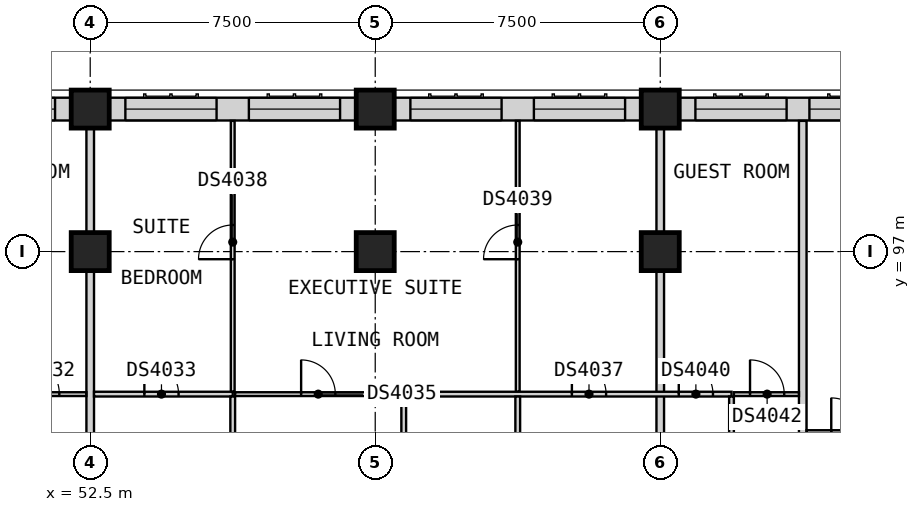
"""IFC4 building model, lengths in metres.
Left out: names, types, materials, properties, quantities, classifications, styles, units other than length and angle.
Written with IfcOpenShell. Run it as: python <this file> out.ifc"""

import sys

from ifc_helpers import new_model, si_unit, direction, frame, frame_2d, origin, origin_2d, place, context, subcontext, project, spatial, rectangle, extrude, element, fill, save


model = new_model("IFC4")
c1 = context("Model", 3, precision=1e-05, world=origin(), true_north=direction((0.0, 1.0)))
c2 = subcontext(c1, "Body", "Model", "MODEL_VIEW")
j1 = project(units=[si_unit("LENGTHUNIT", "METRE"), si_unit("PLANEANGLEUNIT", "RADIAN")], contexts=[c1])
p1 = place(None, origin())
s1 = spatial("IfcSite", under=j1, at=p1, CompositionType="ELEMENT")
p2 = place(p1, origin())
s2 = spatial("IfcBuilding", under=s1, at=p2, CompositionType="ELEMENT")
p3 = place(p2, frame((0.0, 0.0, 141.0)))
s3 = spatial("IfcBuildingStorey", under=s2, at=p3, CompositionType="ELEMENT", Elevation=141.0)
for number, where, z_axis, x_axis in (
    (1, (52.5, 100.75, 0.0), (0.0, 0.0, 1.0), (1.0, 0.0, 0.0)),
    (2, (60.0, 100.75, 0.0), (0.0, 0.0, 1.0), (1.0, 0.0, 0.0)),
    (3, (67.5, 100.75, 0.0), (0.0, 0.0, 1.0), (1.0, 0.0, 0.0)),
    (4, (52.5, 97.0, 0.0), (0.0, 0.0, 1.0), (1.0, 0.0, 0.0)),
    (5, (60.0, 97.0, 0.0), (0.0, 0.0, 1.0), (1.0, 0.0, 0.0)),
    (6, (67.5, 97.0, 0.0), (0.0, 0.0, 1.0), (1.0, 0.0, 0.0)),
):
    element("IfcColumn", number, at=place(p3, frame(where, z_axis=z_axis, x_axis=x_axis)), inside=s3, PredefinedType="COLUMN", context=c2, shape_type="SweptSolid", body=[
        extrude(rectangle(XDim=1.0, YDim=1.0, at=origin_2d()), origin(), (0.0, 0.0, 1.0), 3.6),
    ])
p4 = place(p3, frame((74.0, 100.75, 0.0), z_axis=(0.0, 0.0, 1.0), x_axis=(-1.0, 0.0, 0.0)))
e7 = element("IfcWall", 7, at=p4, inside=s3, PredefinedType="SOLIDWALL", context=c2, shape_type="SweptSolid", body=[
    extrude(rectangle(XDim=6.0, YDim=0.6, at=frame_2d((3.0, 0.0))), origin(), (0.0, 0.0, 1.0), 2.85),
])
p5 = place(p4, frame((3.175, 0.0, 0.8)))
e8 = element("IfcOpeningElement", 8, at=p5, cuts=e7, PredefinedType="OPENING", context=c2, shape_type="SweptSolid", body=[
    extrude(rectangle(XDim=2.4, YDim=1.8, at=frame_2d((1.2, 0.9))), frame((0.0, 0.31, 0.0), z_axis=(0.0, -1.0, 0.0), x_axis=(1.0, 0.0, 0.0)), (0.0, 0.0, 1.0), 0.62),
])
p6 = place(p4, frame((0.175, 0.0, 0.8)))
e9 = element("IfcOpeningElement", 9, at=p6, cuts=e7, PredefinedType="OPENING", context=c2, shape_type="SweptSolid", body=[
    extrude(rectangle(XDim=2.4, YDim=1.8, at=frame_2d((1.2, 0.9))), frame((0.0, 0.31, 0.0), z_axis=(0.0, -1.0, 0.0), x_axis=(1.0, 0.0, 0.0)), (0.0, 0.0, 1.0), 0.62),
])
p7 = place(p3, frame((67.0, 100.75, 0.0), z_axis=(0.0, 0.0, 1.0), x_axis=(-1.0, 0.0, 0.0)))
e10 = element("IfcWall", 10, at=p7, inside=s3, PredefinedType="SOLIDWALL", context=c2, shape_type="SweptSolid", body=[
    extrude(rectangle(XDim=6.5, YDim=0.6, at=frame_2d((3.25, 0.0))), origin(), (0.0, 0.0, 1.0), 2.85),
])
p8 = place(p7, frame((3.675, 0.0, 0.8)))
e11 = element("IfcOpeningElement", 11, at=p8, cuts=e10, PredefinedType="OPENING", context=c2, shape_type="SweptSolid", body=[
    extrude(rectangle(XDim=2.4, YDim=1.8, at=frame_2d((1.2, 0.9))), frame((0.0, 0.31, 0.0), z_axis=(0.0, -1.0, 0.0), x_axis=(1.0, 0.0, 0.0)), (0.0, 0.0, 1.0), 0.62),
])
p9 = place(p7, frame((0.425, 0.0, 0.8)))
e12 = element("IfcOpeningElement", 12, at=p9, cuts=e10, PredefinedType="OPENING", context=c2, shape_type="SweptSolid", body=[
    extrude(rectangle(XDim=2.4, YDim=1.8, at=frame_2d((1.2, 0.9))), frame((0.0, 0.31, 0.0), z_axis=(0.0, -1.0, 0.0), x_axis=(1.0, 0.0, 0.0)), (0.0, 0.0, 1.0), 0.62),
])
p10 = place(p3, frame((59.5, 100.75, 0.0), z_axis=(0.0, 0.0, 1.0), x_axis=(-1.0, 0.0, 0.0)))
e13 = element("IfcWall", 13, at=p10, inside=s3, PredefinedType="SOLIDWALL", context=c2, shape_type="SweptSolid", body=[
    extrude(rectangle(XDim=6.5, YDim=0.6, at=frame_2d((3.25, 0.0))), origin(), (0.0, 0.0, 1.0), 2.85),
])
p11 = place(p10, frame((3.675, 0.0, 0.8)))
e14 = element("IfcOpeningElement", 14, at=p11, cuts=e13, PredefinedType="OPENING", context=c2, shape_type="SweptSolid", body=[
    extrude(rectangle(XDim=2.4, YDim=1.8, at=frame_2d((1.2, 0.9))), frame((0.0, 0.31, 0.0), z_axis=(0.0, -1.0, 0.0), x_axis=(1.0, 0.0, 0.0)), (0.0, 0.0, 1.0), 0.62),
])
p12 = place(p10, frame((0.425, 0.0, 0.8)))
e15 = element("IfcOpeningElement", 15, at=p12, cuts=e13, PredefinedType="OPENING", context=c2, shape_type="SweptSolid", body=[
    extrude(rectangle(XDim=2.4, YDim=1.8, at=frame_2d((1.2, 0.9))), frame((0.0, 0.31, 0.0), z_axis=(0.0, -1.0, 0.0), x_axis=(1.0, 0.0, 0.0)), (0.0, 0.0, 1.0), 0.62),
])
p13 = place(p3, frame((52.0, 100.75, 0.0), z_axis=(0.0, 0.0, 1.0), x_axis=(-1.0, 0.0, 0.0)))
e16 = element("IfcWall", 16, at=p13, inside=s3, PredefinedType="SOLIDWALL", context=c2, shape_type="SweptSolid", body=[
    extrude(rectangle(XDim=6.5, YDim=0.6, at=frame_2d((3.25, 0.0))), origin(), (0.0, 0.0, 1.0), 2.85),
])
p14 = place(p13, frame((3.675, 0.0, 0.8)))
e17 = element("IfcOpeningElement", 17, at=p14, cuts=e16, PredefinedType="OPENING", context=c2, shape_type="SweptSolid", body=[
    extrude(rectangle(XDim=2.4, YDim=1.8, at=frame_2d((1.2, 0.9))), frame((0.0, 0.31, 0.0), z_axis=(0.0, -1.0, 0.0), x_axis=(1.0, 0.0, 0.0)), (0.0, 0.0, 1.0), 0.62),
])
p15 = place(p13, frame((0.425, 0.0, 0.8)))
e18 = element("IfcOpeningElement", 18, at=p15, cuts=e16, PredefinedType="OPENING", context=c2, shape_type="SweptSolid", body=[
    extrude(rectangle(XDim=2.4, YDim=1.8, at=frame_2d((1.2, 0.9))), frame((0.0, 0.31, 0.0), z_axis=(0.0, -1.0, 0.0), x_axis=(1.0, 0.0, 0.0)), (0.0, 0.0, 1.0), 0.62),
])
for number, where, z_axis, x_axis in (
    (19, (52.5, 88.725, 0.0), (0.0, 0.0, 1.0), (0.0, 1.0, 0.0)),
    (20, (67.5, 88.725, 0.0), (0.0, 0.0, 1.0), (0.0, 1.0, 0.0)),
):
    element("IfcWall", number, at=place(p3, frame(where, z_axis=z_axis, x_axis=x_axis)), inside=s3, PredefinedType="PARTITIONING", context=c2, shape_type="SweptSolid", body=[
        extrude(rectangle(XDim=12.525, YDim=0.2, at=frame_2d((6.262, 0.0))), origin(), (0.0, 0.0, 1.0), 3.35),
    ])
p16 = place(p3, frame((71.25, 88.725, 0.0), z_axis=(0.0, 0.0, 1.0), x_axis=(0.0, 1.0, 0.0)))
e21 = element("IfcWall", 21, at=p16, inside=s3, PredefinedType="PARTITIONING", context=c2, shape_type="SweptSolid", body=[
    extrude(rectangle(XDim=11.715, YDim=0.2, at=frame_2d((5.857, 0.0))), origin(), (0.0, 0.0, 1.0), 3.35),
])
p17 = place(p3, frame((71.35, 92.25, 0.0), z_axis=(0.0, 0.0, 1.0), x_axis=(1.0, 0.0, 0.0)))
e22 = element("IfcWall", 22, at=p17, inside=s3, PredefinedType="PARTITIONING", context=c2, shape_type="SweptSolid", body=[
    extrude(rectangle(XDim=7.35, YDim=0.1, at=frame_2d((3.675, 0.0))), origin(), (0.0, 0.0, 1.0), 3.35),
])
p18 = place(p17, frame((0.65, 0.0, 0.0)))
e23 = element("IfcOpeningElement", 23, at=p18, cuts=e22, PredefinedType="OPENING", context=c2, shape_type="SweptSolid", body=[
    extrude(rectangle(XDim=0.9, YDim=2.1, at=frame_2d((0.45, 1.05))), frame((0.0, 0.06, 0.0), z_axis=(0.0, -1.0, 0.0), x_axis=(1.0, 0.0, 0.0)), (0.0, 0.0, 1.0), 0.12),
])
p19 = place(p3, frame((49.938, 93.25, 0.0), z_axis=(0.0, 0.0, 1.0), x_axis=(1.0, 0.0, 0.0)))
e24 = element("IfcWall", 24, at=p19, inside=s3, PredefinedType="PARTITIONING", context=c2, shape_type="SweptSolid", body=[
    extrude(rectangle(XDim=2.462, YDim=0.1, at=frame_2d((1.231, 0.0))), origin(), (0.0, 0.0, 1.0), 3.35),
])
p20 = place(p19, frame((0.75, 0.0, 0.0)))
e25 = element("IfcOpeningElement", 25, at=p20, cuts=e24, PredefinedType="OPENING", context=c2, shape_type="SweptSolid", body=[
    extrude(rectangle(XDim=1.0, YDim=2.1, at=frame_2d((0.5, 1.05))), frame((0.0, 0.06, 0.0), z_axis=(0.0, -1.0, 0.0), x_axis=(1.0, 0.0, 0.0)), (0.0, 0.0, 1.0), 0.12),
])
p21 = place(p3, frame((56.312, 93.25, 0.0), z_axis=(0.0, 0.0, 1.0), x_axis=(1.0, 0.0, 0.0)))
e26 = element("IfcWall", 26, at=p21, inside=s3, PredefinedType="PARTITIONING", context=c2, shape_type="SweptSolid", body=[
    extrude(rectangle(XDim=4.375, YDim=0.1, at=frame_2d((2.188, 0.0))), origin(), (0.0, 0.0, 1.0), 3.35),
])
p22 = place(p21, frame((1.738, 0.0, 0.0)))
e27 = element("IfcOpeningElement", 27, at=p22, cuts=e26, PredefinedType="OPENING", context=c2, shape_type="SweptSolid", body=[
    extrude(rectangle(XDim=0.9, YDim=2.1, at=frame_2d((0.45, 1.05))), frame((0.0, 0.06, 0.0), z_axis=(0.0, -1.0, 0.0), x_axis=(1.0, 0.0, 0.0)), (0.0, 0.0, 1.0), 0.12),
])
p23 = place(p3, frame((69.438, 93.25, 0.0), z_axis=(0.0, 0.0, 1.0), x_axis=(1.0, 0.0, 0.0)))
e28 = element("IfcWall", 28, at=p23, inside=s3, PredefinedType="PARTITIONING", context=c2, shape_type="SweptSolid", body=[
    extrude(rectangle(XDim=1.712, YDim=0.1, at=frame_2d((0.856, 0.0))), origin(), (0.0, 0.0, 1.0), 3.35),
])
p24 = place(p23, frame((0.425, 0.0, 0.0)))
e29 = element("IfcOpeningElement", 29, at=p24, cuts=e28, PredefinedType="OPENING", context=c2, shape_type="SweptSolid", body=[
    extrude(rectangle(XDim=0.9, YDim=2.1, at=frame_2d((0.45, 1.05))), frame((0.0, 0.06, 0.0), z_axis=(0.0, -1.0, 0.0), x_axis=(1.0, 0.0, 0.0)), (0.0, 0.0, 1.0), 0.12),
])
p25 = place(p3, frame((56.25, 93.312, 0.0), z_axis=(0.0, 0.0, 1.0), x_axis=(0.0, 1.0, 0.0)))
e30 = element("IfcWall", 30, at=p25, inside=s3, PredefinedType="PARTITIONING", context=c2, shape_type="SweptSolid", body=[
    extrude(rectangle(XDim=7.127, YDim=0.1, at=frame_2d((3.564, 0.0))), origin(), (0.0, 0.0, 1.0), 3.35),
])
p26 = place(p25, frame((3.488, 0.0, 0.0)))
e31 = element("IfcOpeningElement", 31, at=p26, cuts=e30, PredefinedType="OPENING", context=c2, shape_type="SweptSolid", body=[
    extrude(rectangle(XDim=0.9, YDim=2.1, at=frame_2d((0.45, 1.05))), frame((0.0, 0.06, 0.0), z_axis=(0.0, -1.0, 0.0), x_axis=(1.0, 0.0, 0.0)), (0.0, 0.0, 1.0), 0.12),
])
p27 = place(p3, frame((63.75, 93.312, 0.0), z_axis=(0.0, 0.0, 1.0), x_axis=(0.0, 1.0, 0.0)))
e32 = element("IfcWall", 32, at=p27, inside=s3, PredefinedType="PARTITIONING", context=c2, shape_type="SweptSolid", body=[
    extrude(rectangle(XDim=7.127, YDim=0.1, at=frame_2d((3.564, 0.0))), origin(), (0.0, 0.0, 1.0), 3.35),
])
p28 = place(p27, frame((3.488, 0.0, 0.0)))
e33 = element("IfcOpeningElement", 33, at=p28, cuts=e32, PredefinedType="OPENING", context=c2, shape_type="SweptSolid", body=[
    extrude(rectangle(XDim=0.9, YDim=2.1, at=frame_2d((0.45, 1.05))), frame((0.0, 0.06, 0.0), z_axis=(0.0, -1.0, 0.0), x_axis=(1.0, 0.0, 0.0)), (0.0, 0.0, 1.0), 0.12),
])
p29 = place(p3, frame((52.6, 93.25, 0.0), z_axis=(0.0, 0.0, 1.0), x_axis=(1.0, 0.0, 0.0)))
e34 = element("IfcWall", 34, at=p29, inside=s3, PredefinedType="PARTITIONING", context=c2, shape_type="SweptSolid", body=[
    extrude(rectangle(XDim=3.65, YDim=0.125, at=frame_2d((1.825, 0.0))), origin(), (0.0, 0.0, 1.0), 3.35),
])
p30 = place(p29, frame((1.325, 0.0, 0.0)))
e35 = element("IfcOpeningElement", 35, at=p30, cuts=e34, PredefinedType="OPENING", context=c2, shape_type="SweptSolid", body=[
    extrude(rectangle(XDim=0.9, YDim=2.1, at=frame_2d((0.45, 1.05))), frame((0.0, 0.073, 0.0), z_axis=(0.0, -1.0, 0.0), x_axis=(1.0, 0.0, 0.0)), (0.0, 0.0, 1.0), 0.145),
])
p31 = place(p3, frame((60.75, 93.25, 0.0), z_axis=(0.0, 0.0, 1.0), x_axis=(1.0, 0.0, 0.0)))
e36 = element("IfcWall", 36, at=p31, inside=s3, PredefinedType="PARTITIONING", context=c2, shape_type="SweptSolid", body=[
    extrude(rectangle(XDim=8.625, YDim=0.125, at=frame_2d((4.312, 0.0))), origin(), (0.0, 0.0, 1.0), 3.35),
])
p32 = place(p31, frame((4.425, 0.0, 0.0)))
e37 = element("IfcOpeningElement", 37, at=p32, cuts=e36, PredefinedType="OPENING", context=c2, shape_type="SweptSolid", body=[
    extrude(rectangle(XDim=0.9, YDim=2.1, at=frame_2d((0.45, 1.05))), frame((0.0, 0.073, 0.0), z_axis=(0.0, -1.0, 0.0), x_axis=(1.0, 0.0, 0.0)), (0.0, 0.0, 1.0), 0.145),
])
p33 = place(p31, frame((7.238, 0.0, 0.0)))
e38 = element("IfcOpeningElement", 38, at=p33, cuts=e36, PredefinedType="OPENING", context=c2, shape_type="SweptSolid", body=[
    extrude(rectangle(XDim=0.9, YDim=2.1, at=frame_2d((0.45, 1.05))), frame((0.0, 0.073, 0.0), z_axis=(0.0, -1.0, 0.0), x_axis=(1.0, 0.0, 0.0)), (0.0, 0.0, 1.0), 0.145),
])
p34 = place(p3, frame((56.25, 88.725, 0.0), z_axis=(0.0, 0.0, 1.0), x_axis=(0.0, 1.0, 0.0)))
e39 = element("IfcWall", 39, at=p34, inside=s3, PredefinedType="PARTITIONING", context=c2, shape_type="SweptSolid", body=[
    extrude(rectangle(XDim=4.462, YDim=0.125, at=frame_2d((2.231, 0.0))), origin(), (0.0, 0.0, 1.0), 3.35),
])
p35 = place(p3, frame((60.75, 88.725, 0.0), z_axis=(0.0, 0.0, 1.0), x_axis=(0.0, 1.0, 0.0)))
e40 = element("IfcWall", 40, at=p35, inside=s3, PredefinedType="PARTITIONING", context=c2, shape_type="SweptSolid", body=[
    extrude(rectangle(XDim=4.462, YDim=0.125, at=frame_2d((2.231, 0.0))), origin(), (0.0, 0.0, 1.0), 3.35),
])
p36 = place(p35, frame((1.825, 0.0, 0.0)))
e41 = element("IfcOpeningElement", 41, at=p36, cuts=e40, PredefinedType="OPENING", context=c2, shape_type="SweptSolid", body=[
    extrude(rectangle(XDim=0.9, YDim=2.1, at=frame_2d((0.45, 1.05))), frame((0.0, 0.073, 0.0), z_axis=(0.0, -1.0, 0.0), x_axis=(1.0, 0.0, 0.0)), (0.0, 0.0, 1.0), 0.145),
])
for number, where, z_axis, x_axis in (
    (42, (63.75, 88.725, 0.0), (0.0, 0.0, 1.0), (0.0, 1.0, 0.0)),
    (43, (69.375, 88.725, 0.0), (0.0, 0.0, 1.0), (0.0, 1.0, 0.0)),
):
    element("IfcWall", number, at=place(p3, frame(where, z_axis=z_axis, x_axis=x_axis)), inside=s3, PredefinedType="PARTITIONING", context=c2, shape_type="SweptSolid", body=[
        extrude(rectangle(XDim=4.462, YDim=0.125, at=frame_2d((2.231, 0.0))), origin(), (0.0, 0.0, 1.0), 3.35),
    ])
p37 = place(p5, origin())
e44 = element("IfcWindow", 44, at=p37, inside=s3, PartitioningType="SINGLE_PANEL", PredefinedType="WINDOW", context=c2, shape_type="SweptSolid", body=[
    extrude(rectangle(XDim=2.4, YDim=1.8, at=frame_2d((1.2, 0.9))), frame((0.0, -0.07, 0.0), z_axis=(0.0, -1.0, 0.0), x_axis=(1.0, 0.0, 0.0)), (0.0, 0.0, 1.0), 0.06),
])
fill(e8, e44)
p38 = place(p6, origin())
e45 = element("IfcWindow", 45, at=p38, inside=s3, PartitioningType="SINGLE_PANEL", PredefinedType="WINDOW", context=c2, shape_type="SweptSolid", body=[
    extrude(rectangle(XDim=2.4, YDim=1.8, at=frame_2d((1.2, 0.9))), frame((0.0, -0.07, 0.0), z_axis=(0.0, -1.0, 0.0), x_axis=(1.0, 0.0, 0.0)), (0.0, 0.0, 1.0), 0.06),
])
fill(e9, e45)
p39 = place(p8, origin())
e46 = element("IfcWindow", 46, at=p39, inside=s3, PartitioningType="SINGLE_PANEL", PredefinedType="WINDOW", context=c2, shape_type="SweptSolid", body=[
    extrude(rectangle(XDim=2.4, YDim=1.8, at=frame_2d((1.2, 0.9))), frame((0.0, -0.07, 0.0), z_axis=(0.0, -1.0, 0.0), x_axis=(1.0, 0.0, 0.0)), (0.0, 0.0, 1.0), 0.06),
])
fill(e11, e46)
p40 = place(p9, origin())
e47 = element("IfcWindow", 47, at=p40, inside=s3, PartitioningType="SINGLE_PANEL", PredefinedType="WINDOW", context=c2, shape_type="SweptSolid", body=[
    extrude(rectangle(XDim=2.4, YDim=1.8, at=frame_2d((1.2, 0.9))), frame((0.0, -0.07, 0.0), z_axis=(0.0, -1.0, 0.0), x_axis=(1.0, 0.0, 0.0)), (0.0, 0.0, 1.0), 0.06),
])
fill(e12, e47)
p41 = place(p11, origin())
e48 = element("IfcWindow", 48, at=p41, inside=s3, PartitioningType="SINGLE_PANEL", PredefinedType="WINDOW", context=c2, shape_type="SweptSolid", body=[
    extrude(rectangle(XDim=2.4, YDim=1.8, at=frame_2d((1.2, 0.9))), frame((0.0, -0.07, 0.0), z_axis=(0.0, -1.0, 0.0), x_axis=(1.0, 0.0, 0.0)), (0.0, 0.0, 1.0), 0.06),
])
fill(e14, e48)
p42 = place(p12, origin())
e49 = element("IfcWindow", 49, at=p42, inside=s3, PartitioningType="SINGLE_PANEL", PredefinedType="WINDOW", context=c2, shape_type="SweptSolid", body=[
    extrude(rectangle(XDim=2.4, YDim=1.8, at=frame_2d((1.2, 0.9))), frame((0.0, -0.07, 0.0), z_axis=(0.0, -1.0, 0.0), x_axis=(1.0, 0.0, 0.0)), (0.0, 0.0, 1.0), 0.06),
])
fill(e15, e49)
p43 = place(p15, origin())
e50 = element("IfcWindow", 50, at=p43, inside=s3, PartitioningType="SINGLE_PANEL", PredefinedType="WINDOW", context=c2, shape_type="SweptSolid", body=[
    extrude(rectangle(XDim=2.4, YDim=1.8, at=frame_2d((1.2, 0.9))), frame((0.0, -0.07, 0.0), z_axis=(0.0, -1.0, 0.0), x_axis=(1.0, 0.0, 0.0)), (0.0, 0.0, 1.0), 0.06),
])
fill(e18, e50)
p44 = place(p20, origin())
e51 = element("IfcDoor", 51, at=p44, inside=s3, OperationType="SINGLE_SWING_RIGHT", PredefinedType="DOOR", context=c2, shape_type="SweptSolid", body=[
    extrude(rectangle(XDim=1.0, YDim=2.1, at=frame_2d((0.5, 1.05))), frame((0.0, 0.025, 0.0), z_axis=(0.0, -1.0, 0.0), x_axis=(1.0, 0.0, 0.0)), (0.0, 0.0, 1.0), 0.05),
])
fill(e25, e51)
p45 = place(p30, origin())
e52 = element("IfcDoor", 52, at=p45, inside=s3, OperationType="SINGLE_SWING_RIGHT", PredefinedType="DOOR", context=c2, shape_type="SweptSolid", body=[
    extrude(rectangle(XDim=0.9, YDim=2.1, at=frame_2d((0.45, 1.05))), frame((0.0, 0.025, 0.0), z_axis=(0.0, -1.0, 0.0), x_axis=(1.0, 0.0, 0.0)), (0.0, 0.0, 1.0), 0.05),
])
fill(e35, e52)
p46 = place(p22, origin())
e53 = element("IfcDoor", 53, at=p46, inside=s3, OperationType="SINGLE_SWING_RIGHT", PredefinedType="DOOR", context=c2, shape_type="SweptSolid", body=[
    extrude(rectangle(XDim=0.9, YDim=2.1, at=frame_2d((0.45, 1.05))), frame((0.0, 0.025, 0.0), z_axis=(0.0, -1.0, 0.0), x_axis=(1.0, 0.0, 0.0)), (0.0, 0.0, 1.0), 0.05),
])
fill(e27, e53)
p47 = place(p32, origin())
e54 = element("IfcDoor", 54, at=p47, inside=s3, OperationType="SINGLE_SWING_RIGHT", PredefinedType="DOOR", context=c2, shape_type="SweptSolid", body=[
    extrude(rectangle(XDim=0.9, YDim=2.1, at=frame_2d((0.45, 1.05))), frame((0.0, 0.025, 0.0), z_axis=(0.0, -1.0, 0.0), x_axis=(1.0, 0.0, 0.0)), (0.0, 0.0, 1.0), 0.05),
])
fill(e37, e54)
p48 = place(p26, origin())
e55 = element("IfcDoor", 55, at=p48, inside=s3, OperationType="SINGLE_SWING_LEFT", PredefinedType="DOOR", context=c2, shape_type="SweptSolid", body=[
    extrude(rectangle(XDim=0.9, YDim=2.1, at=frame_2d((0.45, 1.05))), frame((0.0, 0.025, 0.0), z_axis=(0.0, -1.0, 0.0), x_axis=(1.0, 0.0, 0.0)), (0.0, 0.0, 1.0), 0.05),
])
fill(e31, e55)
p49 = place(p28, origin())
e56 = element("IfcDoor", 56, at=p49, inside=s3, OperationType="SINGLE_SWING_LEFT", PredefinedType="DOOR", context=c2, shape_type="SweptSolid", body=[
    extrude(rectangle(XDim=0.9, YDim=2.1, at=frame_2d((0.45, 1.05))), frame((0.0, 0.025, 0.0), z_axis=(0.0, -1.0, 0.0), x_axis=(1.0, 0.0, 0.0)), (0.0, 0.0, 1.0), 0.05),
])
fill(e33, e56)
p50 = place(p33, origin())
e57 = element("IfcDoor", 57, at=p50, inside=s3, OperationType="SINGLE_SWING_RIGHT", PredefinedType="DOOR", context=c2, shape_type="SweptSolid", body=[
    extrude(rectangle(XDim=0.9, YDim=2.1, at=frame_2d((0.45, 1.05))), frame((0.0, 0.025, 0.0), z_axis=(0.0, -1.0, 0.0), x_axis=(1.0, 0.0, 0.0)), (0.0, 0.0, 1.0), 0.05),
])
fill(e38, e57)
p51 = place(p24, origin())
e58 = element("IfcDoor", 58, at=p51, inside=s3, OperationType="SINGLE_SWING_RIGHT", PredefinedType="DOOR", context=c2, shape_type="SweptSolid", body=[
    extrude(rectangle(XDim=0.9, YDim=2.1, at=frame_2d((0.45, 1.05))), frame((0.0, 0.025, 0.0), z_axis=(0.0, -1.0, 0.0), x_axis=(1.0, 0.0, 0.0)), (0.0, 0.0, 1.0), 0.05),
])
fill(e29, e58)
p52 = place(p18, origin())
e59 = element("IfcDoor", 59, at=p52, inside=s3, OperationType="SINGLE_SWING_LEFT", PredefinedType="DOOR", context=c2, shape_type="SweptSolid", body=[
    extrude(rectangle(XDim=0.9, YDim=2.1, at=frame_2d((0.45, 1.05))), frame((0.0, 0.025, 0.0), z_axis=(0.0, -1.0, 0.0), x_axis=(1.0, 0.0, 0.0)), (0.0, 0.0, 1.0), 0.05),
])
fill(e23, e59)
save(model, sys.argv[1])
